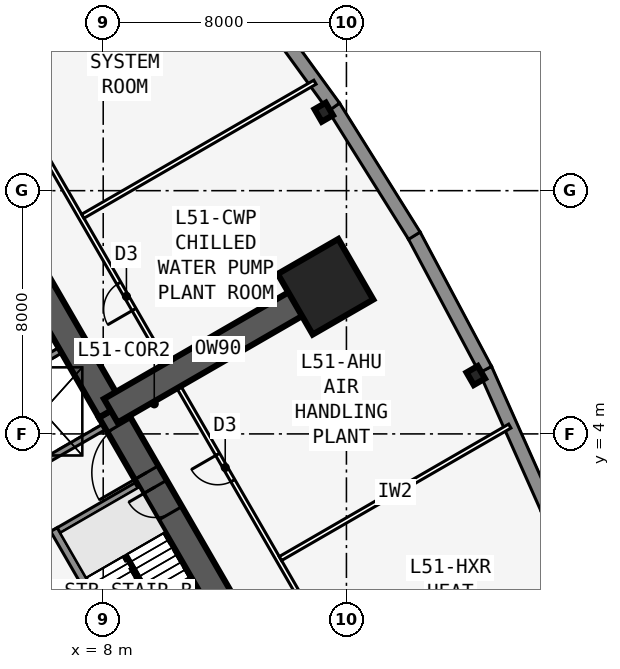
"""IFC4 building model, lengths in metres.
Left out: names, types, materials, properties, quantities, classifications, styles, units other than length and angle.
Written with IfcOpenShell. Run it as: python <this file> out.ifc"""

import sys

from ifc_helpers import new_model, si_unit, direction, frame, frame_2d, origin, origin_2d, place, context, subcontext, project, spatial, polyline, rectangle, i_section, outline, extrude, element, fill, save


model = new_model("IFC4")
c1 = context("Model", 3, precision=1e-05, world=origin(), true_north=direction((0.0, 1.0)))
c2 = subcontext(c1, "Body", "Model", "MODEL_VIEW")
j1 = project(units=[si_unit("LENGTHUNIT", "METRE"), si_unit("PLANEANGLEUNIT", "RADIAN")], contexts=[c1])
p1 = place(None, origin())
s1 = spatial("IfcSite", under=j1, at=p1, CompositionType="ELEMENT")
p2 = place(p1, origin())
s2 = spatial("IfcBuilding", under=s1, at=p2, CompositionType="ELEMENT")
p3 = place(p2, frame((0.0, 0.0, 189.5)))
s3 = spatial("IfcBuildingStorey", under=s2, at=p3, CompositionType="ELEMENT", Elevation=189.5)
p4 = place(p3, frame((16.5, -9.526, 0.0), z_axis=(0.0, 0.0, 1.0), x_axis=(-0.499996545922, 0.866027397988, 0.0)))
e1 = element("IfcWall", 1, at=p4, inside=s3, PredefinedType="SHEAR", context=c2, shape_type="SweptSolid", body=[
    extrude(rectangle(XDim=16.5, YDim=0.9, at=frame_2d((8.25, 0.0))), origin(), (0.0, 0.0, 1.0), 6.4),
])
p5 = place(p4, frame((14.15, 0.0, 0.0)))
e2 = element("IfcOpeningElement", 2, at=p5, cuts=e1, PredefinedType="OPENING", context=c2, shape_type="SweptSolid", body=[
    extrude(rectangle(XDim=1.8, YDim=2.13, at=frame_2d((0.9, 1.065))), frame((0.0, 0.46, 0.0), z_axis=(0.0, -1.0, 0.0), x_axis=(1.0, 0.0, 0.0)), (0.0, 0.0, 1.0), 0.92),
])
p6 = place(p4, frame((12.6, 0.0, 0.0)))
e3 = element("IfcOpeningElement", 3, at=p6, cuts=e1, PredefinedType="OPENING", context=c2, shape_type="SweptSolid", body=[
    extrude(rectangle(XDim=1.0, YDim=2.13, at=frame_2d((0.5, 1.065))), frame((0.0, 0.46, 0.0), z_axis=(0.0, -1.0, 0.0), x_axis=(1.0, 0.0, 0.0)), (0.0, 0.0, 1.0), 0.92),
])
p7 = place(p3, frame((8.25, 4.763, 0.0), z_axis=(0.0, 0.0, 1.0), x_axis=(-0.500002952946, 0.866023698893, 0.0)))
e4 = element("IfcWall", 4, at=p7, inside=s3, PredefinedType="SHEAR", context=c2, shape_type="SweptSolid", body=[
    extrude(rectangle(XDim=16.5, YDim=0.9, at=frame_2d((8.25, 0.0))), origin(), (0.0, 0.0, 1.0), 6.4),
])
p8 = place(p3, frame((10.245, -5.843, 0.0), z_axis=(0.0, 0.0, 1.0), x_axis=(-0.499993009313, 0.866029439822, 0.0)))
e5 = element("IfcWall", 5, at=p8, inside=s3, PredefinedType="SOLIDWALL", context=c2, shape_type="SweptSolid", body=[
    extrude(rectangle(XDim=7.733, YDim=0.25, at=frame_2d((3.866, 0.0))), origin(), (0.0, 0.0, 1.0), 6.15),
])
for number, where, z_axis, x_axis in (
    (6, (6.429, 0.767, 0.0), (0.0, 0.0, 1.0), (0.866, 0.5, 0.0)),
    (7, (5.329, 2.673, 0.0), (0.0, 0.0, 1.0), (0.866, 0.5, 0.0)),
    (8, (3.879, 5.184, 0.0), (0.0, 0.0, 1.0), (0.866, 0.5, 0.0)),
):
    element("IfcWall", number, at=place(p3, frame(where, z_axis=z_axis, x_axis=x_axis)), inside=s3, PredefinedType="SOLIDWALL", context=c2, shape_type="SweptSolid", body=[
        extrude(rectangle(XDim=3.125, YDim=0.2, at=frame_2d((1.562, 0.0))), origin(), (0.0, 0.0, 1.0), 6.15),
    ])
p9 = place(p3, frame((8.25, 4.763, 0.0), z_axis=(0.0, 0.0, 1.0), x_axis=(0.866023543838, 0.500003221507, 0.0)))
e9 = element("IfcWall", 9, at=p9, inside=s3, PredefinedType="SHEAR", context=c2, shape_type="SweptSolid", body=[
    extrude(rectangle(XDim=8.154, YDim=0.9, at=frame_2d((4.077, 0.0))), origin(), (0.0, 0.0, 1.0), 6.4),
])
for number, where, z_axis, x_axis in (
    (10, (20.254, 5.92, 0.0), (0.0, 0.0, 1.0), (0.866, 0.5, 0.0)),
    (11, (15.254, 14.58, 0.0), (0.0, 0.0, 1.0), (0.866, 0.5, 0.0)),
):
    element("IfcColumn", number, at=place(p3, frame(where, z_axis=z_axis, x_axis=x_axis)), inside=s3, PredefinedType="COLUMN", context=c2, shape_type="SweptSolid", body=[
        extrude(i_section(OverallWidth=0.424, OverallDepth=0.475, WebThickness=0.048, FlangeThickness=0.077, at=origin_2d()), origin(), (0.0, 0.0, 1.0), 6.4),
    ])
p10 = place(p3, frame((15.312, 8.84, 0.0), z_axis=(0.0, 0.0, 1.0), x_axis=(0.866025403784, 0.5, 0.0)))
e12 = element("IfcColumn", 12, at=p10, inside=s3, PredefinedType="COLUMN", context=c2, shape_type="SweptSolid", body=[
    extrude(rectangle(XDim=2.3, YDim=2.3, at=origin_2d()), origin(), (0.0, 0.0, 1.0), 6.4),
])
p11 = place(p3, frame((22.613, 1.536, 0.0), z_axis=(0.0, 0.0, 1.0), x_axis=(-0.406850247885, 0.913494869058, 0.0)))
e13 = element("IfcWall", 13, at=p11, inside=s3, PredefinedType="SOLIDWALL", context=c2, shape_type="SweptSolid", body=[
    extrude(outline(polyline([(0.0, 0.0), (5.027, 0.0), (5.027, 6.15), (0.0, 6.15), (0.0, 0.0)]), holes=[polyline([(4.414, 3.075), (4.349, 3.567), (4.159, 4.025), (3.857, 4.418), (3.464, 4.72), (3.006, 4.91), (2.514, 4.975), (2.022, 4.91), (1.564, 4.72), (1.17, 4.418), (0.868, 4.025), (0.678, 3.567), (0.614, 3.075), (0.678, 2.583), (0.868, 2.125), (1.17, 1.731), (1.564, 1.43), (2.022, 1.24), (2.514, 1.175), (3.006, 1.24), (3.464, 1.43), (3.857, 1.731), (4.159, 2.125), (4.349, 2.583), (4.414, 3.075)])]), frame((0.0, 0.225, 0.0), z_axis=(0.0, -1.0, 0.0), x_axis=(1.0, 0.0, 0.0)), (0.0, 0.0, 1.0), 0.45),
])
p12 = place(p3, frame((20.575, 6.115, 0.0), z_axis=(0.0, 0.0, 1.0), x_axis=(-0.469404966864, 0.882982999317, 0.0)))
e14 = element("IfcWall", 14, at=p12, inside=s3, PredefinedType="SOLIDWALL", context=c2, shape_type="SweptSolid", body=[
    extrude(outline(polyline([(0.0, 0.0), (5.003, 0.0), (5.003, 6.15), (0.0, 6.15), (0.0, 0.0)]), holes=[polyline([(4.402, 3.075), (4.337, 3.567), (4.147, 4.025), (3.845, 4.418), (3.451, 4.72), (2.993, 4.91), (2.501, 4.975), (2.01, 4.91), (1.552, 4.72), (1.158, 4.418), (0.856, 4.025), (0.666, 3.567), (0.602, 3.075), (0.666, 2.583), (0.856, 2.125), (1.158, 1.731), (1.552, 1.43), (2.01, 1.24), (2.501, 1.175), (2.993, 1.24), (3.451, 1.43), (3.845, 1.731), (4.147, 2.125), (4.337, 2.583), (4.402, 3.075)])]), frame((0.0, 0.225, 0.0), z_axis=(0.0, -1.0, 0.0), x_axis=(1.0, 0.0, 0.0)), (0.0, 0.0, 1.0), 0.45),
])
p13 = place(p3, frame((18.234, 10.518, 0.0), z_axis=(0.0, 0.0, 1.0), x_axis=(-0.529990167382, 0.84800378683, 0.0)))
e15 = element("IfcWall", 15, at=p13, inside=s3, PredefinedType="SOLIDWALL", context=c2, shape_type="SweptSolid", body=[
    extrude(outline(polyline([(0.0, 0.0), (5.003, 0.0), (5.003, 6.15), (0.0, 6.15), (0.0, 0.0)]), holes=[polyline([(4.402, 3.075), (4.337, 3.567), (4.147, 4.025), (3.845, 4.418), (3.451, 4.72), (2.993, 4.91), (2.501, 4.975), (2.01, 4.91), (1.552, 4.72), (1.158, 4.418), (0.856, 4.025), (0.666, 3.567), (0.602, 3.075), (0.666, 2.583), (0.856, 2.125), (1.158, 1.731), (1.552, 1.43), (2.01, 1.24), (2.501, 1.175), (2.993, 1.24), (3.451, 1.43), (3.845, 1.731), (4.147, 2.125), (4.337, 2.583), (4.402, 3.075)])]), frame((0.0, 0.225, 0.0), z_axis=(0.0, -1.0, 0.0), x_axis=(1.0, 0.0, 0.0)), (0.0, 0.0, 1.0), 0.45),
])
p14 = place(p3, frame((15.591, 14.748, 0.0), z_axis=(0.0, 0.0, 1.0), x_axis=(-0.587692278424, 0.809084535682, 0.0)))
e16 = element("IfcWall", 16, at=p14, inside=s3, PredefinedType="SOLIDWALL", context=c2, shape_type="SweptSolid", body=[
    extrude(outline(polyline([(0.0, 0.0), (5.027, 0.0), (5.027, 6.15), (0.0, 6.15), (0.0, 0.0)]), holes=[polyline([(4.414, 3.075), (4.349, 3.567), (4.159, 4.025), (3.857, 4.418), (3.464, 4.72), (3.006, 4.91), (2.514, 4.975), (2.022, 4.91), (1.564, 4.72), (1.17, 4.418), (0.868, 4.025), (0.678, 3.567), (0.614, 3.075), (0.678, 2.583), (0.868, 2.125), (1.17, 1.731), (1.564, 1.43), (2.022, 1.24), (2.514, 1.175), (3.006, 1.24), (3.464, 1.43), (3.857, 1.731), (4.159, 2.125), (4.349, 2.583), (4.414, 3.075)])]), frame((0.0, 0.225, 0.0), z_axis=(0.0, -1.0, 0.0), x_axis=(1.0, 0.0, 0.0)), (0.0, 0.0, 1.0), 0.45),
])
p15 = place(p3, frame((20.027, -10.985, 0.0), z_axis=(0.0, 0.0, 1.0), x_axis=(-0.500001677587, 0.866024435227, 0.0)))
e17 = element("IfcWall", 17, at=p15, inside=s3, PredefinedType="PARTITIONING", context=c2, shape_type="SweptSolid", body=[
    extrude(rectangle(XDim=39.054, YDim=0.15, at=frame_2d((19.527, 0.0))), origin(), (0.0, 0.0, 1.0), 6.15),
])
p16 = place(p15, frame((5.914, 0.0, 0.0)))
e18 = element("IfcOpeningElement", 18, at=p16, cuts=e17, PredefinedType="OPENING", context=c2, shape_type="SweptSolid", body=[
    extrude(rectangle(XDim=1.0, YDim=2.13, at=frame_2d((0.5, 1.065))), frame((0.0, 0.085, 0.0), z_axis=(0.0, -1.0, 0.0), x_axis=(1.0, 0.0, 0.0)), (0.0, 0.0, 1.0), 0.17),
])
p17 = place(p15, frame((15.527, 0.0, 0.0)))
e19 = element("IfcOpeningElement", 19, at=p17, cuts=e17, PredefinedType="OPENING", context=c2, shape_type="SweptSolid", body=[
    extrude(rectangle(XDim=1.0, YDim=2.13, at=frame_2d((0.5, 1.065))), frame((0.0, 0.085, 0.0), z_axis=(0.0, -1.0, 0.0), x_axis=(1.0, 0.0, 0.0)), (0.0, 0.0, 1.0), 0.17),
])
p18 = place(p15, frame((22.027, 0.0, 0.0)))
e20 = element("IfcOpeningElement", 20, at=p18, cuts=e17, PredefinedType="OPENING", context=c2, shape_type="SweptSolid", body=[
    extrude(rectangle(XDim=1.0, YDim=2.13, at=frame_2d((0.5, 1.065))), frame((0.0, 0.085, 0.0), z_axis=(0.0, -1.0, 0.0), x_axis=(1.0, 0.0, 0.0)), (0.0, 0.0, 1.0), 0.17),
])
p19 = place(p15, frame((31.64, 0.0, 0.0)))
e21 = element("IfcOpeningElement", 21, at=p19, cuts=e17, PredefinedType="OPENING", context=c2, shape_type="SweptSolid", body=[
    extrude(rectangle(XDim=1.0, YDim=2.13, at=frame_2d((0.5, 1.065))), frame((0.0, 0.085, 0.0), z_axis=(0.0, -1.0, 0.0), x_axis=(1.0, 0.0, 0.0)), (0.0, 0.0, 1.0), 0.17),
])
p20 = place(p3, frame((13.829, -0.099, 0.0), z_axis=(0.0, 0.0, 1.0), x_axis=(0.866013391923, 0.500020804578, 0.0)))
e22 = element("IfcWall", 22, at=p20, inside=s3, PredefinedType="PARTITIONING", context=c2, shape_type="SweptSolid", body=[
    extrude(rectangle(XDim=8.713, YDim=0.15, at=frame_2d((4.356, 0.0))), origin(), (0.0, 0.0, 1.0), 6.15),
])
p21 = place(p3, frame((7.329, 11.159, 0.0), z_axis=(0.0, 0.0, 1.0), x_axis=(0.866010828688, 0.500025243958, 0.0)))
e23 = element("IfcWall", 23, at=p21, inside=s3, PredefinedType="PARTITIONING", context=c2, shape_type="SweptSolid", body=[
    extrude(rectangle(XDim=8.817, YDim=0.15, at=frame_2d((4.409, 0.0))), origin(), (0.0, 0.0, 1.0), 6.15),
])
p22 = place(p3, frame((10.135, -2.401, 0.0), z_axis=(0.0, 0.0, 1.0), x_axis=(-0.499992232847, 0.866029888106, 0.0)))
e24 = element("IfcWall", 24, at=p22, inside=s3, PredefinedType="SOLIDWALL", context=c2, shape_type="SweptSolid", body=[
    extrude(rectangle(XDim=2.794, YDim=0.1, at=frame_2d((1.397, 0.0))), origin(), (0.0, 0.0, 1.0), 6.4),
])
p23 = place(p17, origin())
e25 = element("IfcDoor", 25, at=p23, inside=s3, OperationType="SINGLE_SWING_RIGHT", PredefinedType="DOOR", context=c2, shape_type="SweptSolid", body=[
    extrude(rectangle(XDim=1.0, YDim=2.13, at=frame_2d((0.5, 1.065))), frame((0.0, 0.025, 0.0), z_axis=(0.0, -1.0, 0.0), x_axis=(1.0, 0.0, 0.0)), (0.0, 0.0, 1.0), 0.05),
])
fill(e19, e25)
p24 = place(p18, origin())
e26 = element("IfcDoor", 26, at=p24, inside=s3, OperationType="SINGLE_SWING_LEFT", PredefinedType="DOOR", context=c2, shape_type="SweptSolid", body=[
    extrude(rectangle(XDim=1.0, YDim=2.13, at=frame_2d((0.5, 1.065))), frame((0.0, 0.025, 0.0), z_axis=(0.0, -1.0, 0.0), x_axis=(1.0, 0.0, 0.0)), (0.0, 0.0, 1.0), 0.05),
])
fill(e20, e26)
p25 = place(p5, origin())
e27 = element("IfcDoor", 27, at=p25, inside=s3, OperationType="DOUBLE_DOOR_SINGLE_SWING", PredefinedType="DOOR", context=c2, shape_type="SweptSolid", body=[
    extrude(rectangle(XDim=1.8, YDim=2.13, at=frame_2d((0.9, 1.065))), frame((0.0, 0.025, 0.0), z_axis=(0.0, -1.0, 0.0), x_axis=(1.0, 0.0, 0.0)), (0.0, 0.0, 1.0), 0.05),
])
fill(e2, e27)
p26 = place(p6, origin())
e28 = element("IfcDoor", 28, at=p26, inside=s3, OperationType="SINGLE_SWING_RIGHT", PredefinedType="DOOR", context=c2, shape_type="SweptSolid", body=[
    extrude(rectangle(XDim=1.0, YDim=2.13, at=frame_2d((0.5, 1.065))), frame((0.0, 0.025, 0.0), z_axis=(0.0, -1.0, 0.0), x_axis=(1.0, 0.0, 0.0)), (0.0, 0.0, 1.0), 0.05),
])
fill(e3, e28)
save(model, sys.argv[1])
